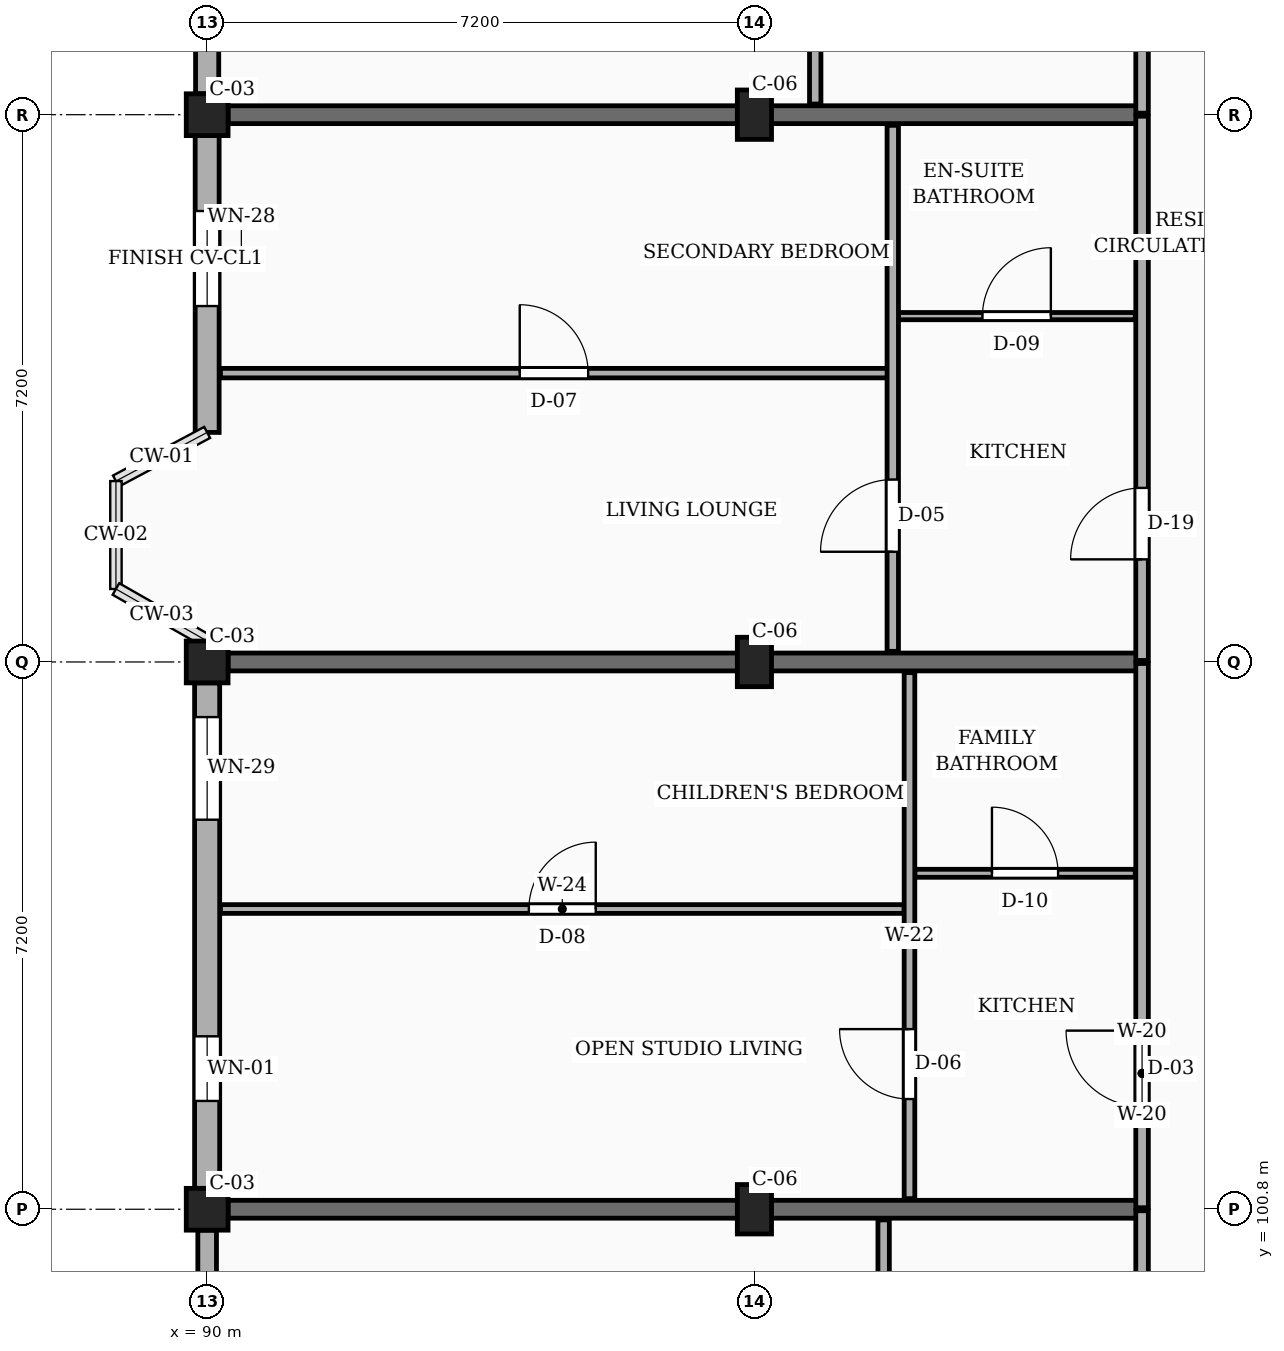
"""IFC4 building model, lengths in metres.
Left out: names, types, materials, properties, quantities, classifications, styles, units other than length and angle.
Written with IfcOpenShell. Run it as: python <this file> out.ifc"""

import sys

from ifc_helpers import new_model, si_unit, direction, frame, frame_2d, origin, origin_2d, place, context, subcontext, project, spatial, rectangle, extrude, element, fill, save


model = new_model("IFC4")
c1 = context("Model", 3, precision=1e-05, world=origin(), true_north=direction((0.0, 1.0)))
c2 = subcontext(c1, "Body", "Model", "MODEL_VIEW")
j1 = project(units=[si_unit("LENGTHUNIT", "METRE"), si_unit("PLANEANGLEUNIT", "RADIAN")], contexts=[c1])
p1 = place(None, origin())
s1 = spatial("IfcSite", under=j1, at=p1, CompositionType="ELEMENT")
p2 = place(p1, origin())
s2 = spatial("IfcBuilding", under=s1, at=p2, CompositionType="ELEMENT")
p3 = place(p2, frame((0.0, 0.0, 17.1)))
s3 = spatial("IfcBuildingStorey", under=s2, at=p3, CompositionType="ELEMENT", Elevation=17.1)
for number, where, z_axis, x_axis in (
    (1, (90.0, 100.8, 0.0), (0.0, 0.0, 1.0), (1.0, 0.0, 0.0)),
    (2, (90.0, 108.0, 0.0), (0.0, 0.0, 1.0), (1.0, 0.0, 0.0)),
    (3, (90.0, 115.2, 0.0), (0.0, 0.0, 1.0), (1.0, 0.0, 0.0)),
):
    element("IfcColumn", number, at=place(p3, frame(where, z_axis=z_axis, x_axis=x_axis)), inside=s3, PredefinedType="COLUMN", context=c2, shape_type="SweptSolid", body=[
        extrude(rectangle(XDim=0.55, YDim=0.55, at=origin_2d()), origin(), (0.0, 0.0, 1.0), 3.15),
    ])
for number, where, z_axis, x_axis in (
    (4, (97.2, 100.8, 0.0), (0.0, 0.0, 1.0), (1.0, 0.0, 0.0)),
    (5, (97.2, 108.0, 0.0), (0.0, 0.0, 1.0), (1.0, 0.0, 0.0)),
    (6, (97.2, 115.2, 0.0), (0.0, 0.0, 1.0), (1.0, 0.0, 0.0)),
):
    element("IfcColumn", number, at=place(p3, frame(where, z_axis=z_axis, x_axis=x_axis)), inside=s3, PredefinedType="COLUMN", context=c2, shape_type="SweptSolid", body=[
        extrude(rectangle(XDim=0.45, YDim=0.65, at=origin_2d()), origin(), (0.0, 0.0, 1.0), 3.15),
    ])
for number, where, z_axis, x_axis in (
    (7, (90.275, 100.8, 0.0), (0.0, 0.0, 1.0), (1.0, 0.0, 0.0)),
    (8, (90.275, 108.0, 0.0), (0.0, 0.0, 1.0), (1.0, 0.0, 0.0)),
    (9, (90.275, 115.2, 0.0), (0.0, 0.0, 1.0), (1.0, 0.0, 0.0)),
):
    element("IfcWall", number, at=place(p3, frame(where, z_axis=z_axis, x_axis=x_axis)), inside=s3, PredefinedType="SOLIDWALL", context=c2, shape_type="SweptSolid", body=[
        extrude(rectangle(XDim=12.025, YDim=0.235, at=frame_2d((6.013, 0.0))), origin(), (0.0, 0.0, 1.0), 2.19),
    ])
p4 = place(p3, frame((90.0, 122.125, 0.0), z_axis=(0.0, 0.0, 1.0), x_axis=(0.0, -1.0, 0.0)))
e10 = element("IfcWall", 10, at=p4, inside=s3, PredefinedType="SOLIDWALL", context=c2, shape_type="SweptSolid", body=[
    extrude(rectangle(XDim=6.65, YDim=0.305, at=frame_2d((3.325, 0.0))), origin(), (0.0, 0.0, 1.0), 2.46),
])
p5 = place(p4, frame((0.45, 0.0, 0.78)))
e11 = element("IfcOpeningElement", 11, at=p5, cuts=e10, PredefinedType="OPENING", context=c2, shape_type="SweptSolid", body=[
    extrude(rectangle(XDim=1.05, YDim=1.44, at=frame_2d((0.525, 0.72))), frame((0.0, 0.163, 0.0), z_axis=(0.0, -1.0, 0.0), x_axis=(1.0, 0.0, 0.0)), (0.0, 0.0, 1.0), 0.325),
])
p6 = place(p4, frame((4.65, 0.0, 0.78)))
e12 = element("IfcOpeningElement", 12, at=p6, cuts=e10, PredefinedType="OPENING", context=c2, shape_type="SweptSolid", body=[
    extrude(rectangle(XDim=1.25, YDim=1.44, at=frame_2d((0.625, 0.72))), frame((0.0, 0.163, 0.0), z_axis=(0.0, -1.0, 0.0), x_axis=(1.0, 0.0, 0.0)), (0.0, 0.0, 1.0), 0.325),
])
p7 = place(p3, frame((90.0, 114.925, 0.0), z_axis=(0.0, 0.0, 1.0), x_axis=(0.0, -1.0, 0.0)))
e13 = element("IfcWall", 13, at=p7, inside=s3, PredefinedType="SOLIDWALL", context=c2, shape_type="SweptSolid", body=[
    extrude(rectangle(XDim=3.905, YDim=0.315, at=frame_2d((1.953, 0.0))), origin(), (0.0, 0.0, 1.0), 2.46),
])
p8 = place(p7, frame((0.992, 0.0, 0.78)))
e14 = element("IfcOpeningElement", 14, at=p8, cuts=e13, PredefinedType="OPENING", context=c2, shape_type="SweptSolid", body=[
    extrude(rectangle(XDim=1.25, YDim=1.44, at=frame_2d((0.625, 0.72))), frame((0.0, 0.167, 0.0), z_axis=(0.0, -1.0, 0.0), x_axis=(1.0, 0.0, 0.0)), (0.0, 0.0, 1.0), 0.335),
])
p9 = place(p3, frame((90.0, 107.725, 0.0), z_axis=(0.0, 0.0, 1.0), x_axis=(0.0, -1.0, 0.0)))
e15 = element("IfcWall", 15, at=p9, inside=s3, PredefinedType="SOLIDWALL", context=c2, shape_type="SweptSolid", body=[
    extrude(rectangle(XDim=6.65, YDim=0.33, at=frame_2d((3.325, 0.0))), origin(), (0.0, 0.0, 1.0), 2.46),
])
p10 = place(p9, frame((0.45, 0.0, 0.78)))
e16 = element("IfcOpeningElement", 16, at=p10, cuts=e15, PredefinedType="OPENING", context=c2, shape_type="SweptSolid", body=[
    extrude(rectangle(XDim=1.35, YDim=1.44, at=frame_2d((0.675, 0.72))), frame((0.0, 0.175, 0.0), z_axis=(0.0, -1.0, 0.0), x_axis=(1.0, 0.0, 0.0)), (0.0, 0.0, 1.0), 0.35),
])
p11 = place(p9, frame((4.65, 0.0, 0.78)))
e17 = element("IfcOpeningElement", 17, at=p11, cuts=e15, PredefinedType="OPENING", context=c2, shape_type="SweptSolid", body=[
    extrude(rectangle(XDim=0.85, YDim=1.15, at=frame_2d((0.425, 0.575))), frame((0.0, 0.175, 0.0), z_axis=(0.0, -1.0, 0.0), x_axis=(1.0, 0.0, 0.0)), (0.0, 0.0, 1.0), 0.35),
])
p12 = place(p3, frame((90.0, 100.525, 0.0), z_axis=(0.0, 0.0, 1.0), x_axis=(0.0, -1.0, 0.0)))
e18 = element("IfcWall", 18, at=p12, inside=s3, PredefinedType="SOLIDWALL", context=c2, shape_type="SweptSolid", body=[
    extrude(rectangle(XDim=3.905, YDim=0.245, at=frame_2d((1.952, 0.0))), origin(), (0.0, 0.0, 1.0), 2.46),
])
p13 = place(p12, frame((1.218, 0.0, 0.78)))
e19 = element("IfcOpeningElement", 19, at=p13, cuts=e18, PredefinedType="OPENING", context=c2, shape_type="SweptSolid", body=[
    extrude(rectangle(XDim=0.85, YDim=1.15, at=frame_2d((0.425, 0.575))), frame((0.0, 0.133, 0.0), z_axis=(0.0, -1.0, 0.0), x_axis=(1.0, 0.0, 0.0)), (0.0, 0.0, 1.0), 0.265),
])
p14 = place(p3, frame((102.3, 93.62, 0.0), z_axis=(0.0, 0.0, 1.0), x_axis=(0.0, 1.0, 0.0)))
e20 = element("IfcWall", 20, at=p14, inside=s3, PredefinedType="PARTITIONING", context=c2, shape_type="SweptSolid", body=[
    extrude(rectangle(XDim=7.16, YDim=0.165, at=frame_2d((3.58, 0.0))), origin(), (0.0, 0.0, 1.0), 2.325),
])
p15 = place(p14, frame((1.33, 0.0, 0.0)))
e21 = element("IfcOpeningElement", 21, at=p15, cuts=e20, PredefinedType="OPENING", context=c2, shape_type="SweptSolid", body=[
    extrude(rectangle(XDim=1.14, YDim=2.18, at=frame_2d((0.57, 1.09))), frame((0.0, 0.093, 0.0), z_axis=(0.0, -1.0, 0.0), x_axis=(1.0, 0.0, 0.0)), (0.0, 0.0, 1.0), 0.185),
])
p16 = place(p3, frame((102.3, 100.82, 0.0), z_axis=(0.0, 0.0, 1.0), x_axis=(0.0, 1.0, 0.0)))
e22 = element("IfcWall", 22, at=p16, inside=s3, PredefinedType="PARTITIONING", context=c2, shape_type="SweptSolid", body=[
    extrude(rectangle(XDim=7.16, YDim=0.165, at=frame_2d((3.58, 0.0))), origin(), (0.0, 0.0, 1.0), 2.325),
])
p17 = place(p16, frame((1.33, 0.0, 0.0)))
e23 = element("IfcOpeningElement", 23, at=p17, cuts=e22, PredefinedType="OPENING", context=c2, shape_type="SweptSolid", body=[
    extrude(rectangle(XDim=1.0, YDim=2.15, at=frame_2d((0.5, 1.075))), frame((0.0, 0.093, 0.0), z_axis=(0.0, -1.0, 0.0), x_axis=(1.0, 0.0, 0.0)), (0.0, 0.0, 1.0), 0.185),
])
p18 = place(p3, frame((102.3, 108.02, 0.0), z_axis=(0.0, 0.0, 1.0), x_axis=(0.0, 1.0, 0.0)))
e24 = element("IfcWall", 24, at=p18, inside=s3, PredefinedType="PARTITIONING", context=c2, shape_type="SweptSolid", body=[
    extrude(rectangle(XDim=7.16, YDim=0.165, at=frame_2d((3.58, 0.0))), origin(), (0.0, 0.0, 1.0), 2.325),
])
p19 = place(p18, frame((1.33, 0.0, 0.0)))
e25 = element("IfcOpeningElement", 25, at=p19, cuts=e24, PredefinedType="OPENING", context=c2, shape_type="SweptSolid", body=[
    extrude(rectangle(XDim=0.94, YDim=2.12, at=frame_2d((0.47, 1.06))), frame((0.0, 0.093, 0.0), z_axis=(0.0, -1.0, 0.0), x_axis=(1.0, 0.0, 0.0)), (0.0, 0.0, 1.0), 0.185),
])
p20 = place(p3, frame((102.3, 115.22, 0.0), z_axis=(0.0, 0.0, 1.0), x_axis=(0.0, 1.0, 0.0)))
e26 = element("IfcWall", 26, at=p20, inside=s3, PredefinedType="PARTITIONING", context=c2, shape_type="SweptSolid", body=[
    extrude(rectangle(XDim=7.16, YDim=0.165, at=frame_2d((3.58, 0.0))), origin(), (0.0, 0.0, 1.0), 2.325),
])
p21 = place(p20, frame((4.78, 0.0, 0.0)))
e27 = element("IfcOpeningElement", 27, at=p21, cuts=e26, PredefinedType="OPENING", context=c2, shape_type="SweptSolid", body=[
    extrude(rectangle(XDim=1.14, YDim=2.18, at=frame_2d((0.57, 1.09))), frame((0.0, 0.093, 0.0), z_axis=(0.0, -1.0, 0.0), x_axis=(1.0, 0.0, 0.0)), (0.0, 0.0, 1.0), 0.185),
])
p22 = place(p3, frame((98.9, 93.74, 0.0), z_axis=(0.0, 0.0, 1.0), x_axis=(0.0, 1.0, 0.0)))
e28 = element("IfcWall", 28, at=p22, inside=s3, PredefinedType="PARTITIONING", context=c2, shape_type="SweptSolid", body=[
    extrude(rectangle(XDim=6.92, YDim=0.15, at=frame_2d((3.46, 0.0))), origin(), (0.0, 0.0, 1.0), 2.325),
])
p23 = place(p22, frame((1.31, 0.0, 0.0)))
e29 = element("IfcOpeningElement", 29, at=p23, cuts=e28, PredefinedType="OPENING", context=c2, shape_type="SweptSolid", body=[
    extrude(rectangle(XDim=0.95, YDim=2.1, at=frame_2d((0.475, 1.05))), frame((0.0, 0.085, 0.0), z_axis=(0.0, -1.0, 0.0), x_axis=(1.0, 0.0, 0.0)), (0.0, 0.0, 1.0), 0.17),
])
p24 = place(p3, frame((90.175, 104.75, 0.0), z_axis=(0.0, 0.0, 1.0), x_axis=(1.0, 0.0, 0.0)))
e30 = element("IfcWall", 30, at=p24, inside=s3, PredefinedType="PARTITIONING", context=c2, shape_type="SweptSolid", body=[
    extrude(rectangle(XDim=8.995, YDim=0.115, at=frame_2d((4.498, 0.0))), origin(), (0.0, 0.0, 1.0), 2.325),
])
p25 = place(p24, frame((4.058, 0.0, 0.0)))
e31 = element("IfcOpeningElement", 31, at=p25, cuts=e30, PredefinedType="OPENING", context=c2, shape_type="SweptSolid", body=[
    extrude(rectangle(XDim=0.88, YDim=2.08, at=frame_2d((0.44, 1.04))), frame((0.0, 0.067, 0.0), z_axis=(0.0, -1.0, 0.0), x_axis=(1.0, 0.0, 0.0)), (0.0, 0.0, 1.0), 0.135),
])
p26 = place(p3, frame((99.31, 105.22, 0.0), z_axis=(0.0, 0.0, 1.0), x_axis=(1.0, 0.0, 0.0)))
e32 = element("IfcWall", 32, at=p26, inside=s3, PredefinedType="PARTITIONING", context=c2, shape_type="SweptSolid", body=[
    extrude(rectangle(XDim=2.9, YDim=0.105, at=frame_2d((1.45, 0.0))), origin(), (0.0, 0.0, 1.0), 2.325),
])
p27 = place(p26, frame((1.015, 0.0, 0.0)))
e33 = element("IfcOpeningElement", 33, at=p27, cuts=e32, PredefinedType="OPENING", context=c2, shape_type="SweptSolid", body=[
    extrude(rectangle(XDim=0.87, YDim=2.05, at=frame_2d((0.435, 1.025))), frame((0.0, 0.062, 0.0), z_axis=(0.0, -1.0, 0.0), x_axis=(1.0, 0.0, 0.0)), (0.0, 0.0, 1.0), 0.125),
])
p28 = place(p3, frame((99.24, 100.94, 0.0), z_axis=(0.0, 0.0, 1.0), x_axis=(0.0, 1.0, 0.0)))
e34 = element("IfcWall", 34, at=p28, inside=s3, PredefinedType="PARTITIONING", context=c2, shape_type="SweptSolid", body=[
    extrude(rectangle(XDim=6.92, YDim=0.14, at=frame_2d((3.46, 0.0))), origin(), (0.0, 0.0, 1.0), 2.325),
])
p29 = place(p28, frame((1.31, 0.0, 0.0)))
e35 = element("IfcOpeningElement", 35, at=p29, cuts=e34, PredefinedType="OPENING", context=c2, shape_type="SweptSolid", body=[
    extrude(rectangle(XDim=0.92, YDim=2.1, at=frame_2d((0.46, 1.05))), frame((0.0, 0.08, 0.0), z_axis=(0.0, -1.0, 0.0), x_axis=(1.0, 0.0, 0.0)), (0.0, 0.0, 1.0), 0.16),
])
p30 = place(p3, frame((90.175, 111.8, 0.0), z_axis=(0.0, 0.0, 1.0), x_axis=(1.0, 0.0, 0.0)))
e36 = element("IfcWall", 36, at=p30, inside=s3, PredefinedType="PARTITIONING", context=c2, shape_type="SweptSolid", body=[
    extrude(rectangle(XDim=8.775, YDim=0.125, at=frame_2d((4.387, 0.0))), origin(), (0.0, 0.0, 1.0), 2.325),
])
p31 = place(p30, frame((3.938, 0.0, 0.0)))
e37 = element("IfcOpeningElement", 37, at=p31, cuts=e36, PredefinedType="OPENING", context=c2, shape_type="SweptSolid", body=[
    extrude(rectangle(XDim=0.9, YDim=2.1, at=frame_2d((0.45, 1.05))), frame((0.0, 0.073, 0.0), z_axis=(0.0, -1.0, 0.0), x_axis=(1.0, 0.0, 0.0)), (0.0, 0.0, 1.0), 0.145),
])
p32 = place(p3, frame((99.09, 112.55, 0.0), z_axis=(0.0, 0.0, 1.0), x_axis=(1.0, 0.0, 0.0)))
e38 = element("IfcWall", 38, at=p32, inside=s3, PredefinedType="PARTITIONING", context=c2, shape_type="SweptSolid", body=[
    extrude(rectangle(XDim=3.12, YDim=0.095, at=frame_2d((1.56, 0.0))), origin(), (0.0, 0.0, 1.0), 2.325),
])
p33 = place(p32, frame((1.11, 0.0, 0.0)))
e39 = element("IfcOpeningElement", 39, at=p33, cuts=e38, PredefinedType="OPENING", context=c2, shape_type="SweptSolid", body=[
    extrude(rectangle(XDim=0.9, YDim=2.05, at=frame_2d((0.45, 1.025))), frame((0.0, 0.058, 0.0), z_axis=(0.0, -1.0, 0.0), x_axis=(1.0, 0.0, 0.0)), (0.0, 0.0, 1.0), 0.115),
])
p34 = place(p3, frame((99.02, 108.14, 0.0), z_axis=(0.0, 0.0, 1.0), x_axis=(0.0, 1.0, 0.0)))
e40 = element("IfcWall", 40, at=p34, inside=s3, PredefinedType="PARTITIONING", context=c2, shape_type="SweptSolid", body=[
    extrude(rectangle(XDim=6.92, YDim=0.15, at=frame_2d((3.46, 0.0))), origin(), (0.0, 0.0, 1.0), 2.325),
])
p35 = place(p34, frame((1.31, 0.0, 0.0)))
e41 = element("IfcOpeningElement", 41, at=p35, cuts=e40, PredefinedType="OPENING", context=c2, shape_type="SweptSolid", body=[
    extrude(rectangle(XDim=0.95, YDim=2.1, at=frame_2d((0.475, 1.05))), frame((0.0, 0.085, 0.0), z_axis=(0.0, -1.0, 0.0), x_axis=(1.0, 0.0, 0.0)), (0.0, 0.0, 1.0), 0.17),
])
p36 = place(p3, frame((98.0, 115.34, 0.0), z_axis=(0.0, 0.0, 1.0), x_axis=(0.0, 1.0, 0.0)))
e42 = element("IfcWall", 42, at=p36, inside=s3, PredefinedType="PARTITIONING", context=c2, shape_type="SweptSolid", body=[
    extrude(rectangle(XDim=6.92, YDim=0.15, at=frame_2d((3.46, 0.0))), origin(), (0.0, 0.0, 1.0), 2.325),
])
p37 = place(p36, frame((4.66, 0.0, 0.0)))
e43 = element("IfcOpeningElement", 43, at=p37, cuts=e42, PredefinedType="OPENING", context=c2, shape_type="SweptSolid", body=[
    extrude(rectangle(XDim=0.95, YDim=2.1, at=frame_2d((0.475, 1.05))), frame((0.0, 0.085, 0.0), z_axis=(0.0, -1.0, 0.0), x_axis=(1.0, 0.0, 0.0)), (0.0, 0.0, 1.0), 0.17),
])
p38 = place(p8, origin())
e44 = element("IfcWindow", 44, at=p38, inside=s3, PartitioningType="SINGLE_PANEL", PredefinedType="WINDOW", context=c2, shape_type="SweptSolid", body=[
    extrude(rectangle(XDim=1.25, YDim=1.44, at=frame_2d((0.625, 0.72))), frame((0.0, 0.03, 0.0), z_axis=(0.0, -1.0, 0.0), x_axis=(1.0, 0.0, 0.0)), (0.0, 0.0, 1.0), 0.06),
])
fill(e14, e44)
p39 = place(p10, origin())
e45 = element("IfcWindow", 45, at=p39, inside=s3, PartitioningType="SINGLE_PANEL", PredefinedType="WINDOW", context=c2, shape_type="SweptSolid", body=[
    extrude(rectangle(XDim=1.35, YDim=1.44, at=frame_2d((0.675, 0.72))), frame((0.0, 0.03, 0.0), z_axis=(0.0, -1.0, 0.0), x_axis=(1.0, 0.0, 0.0)), (0.0, 0.0, 1.0), 0.06),
])
fill(e16, e45)
p40 = place(p11, origin())
e46 = element("IfcWindow", 46, at=p40, inside=s3, PartitioningType="SINGLE_PANEL", PredefinedType="WINDOW", context=c2, shape_type="SweptSolid", body=[
    extrude(rectangle(XDim=0.85, YDim=1.15, at=frame_2d((0.425, 0.575))), frame((0.0, 0.03, 0.0), z_axis=(0.0, -1.0, 0.0), x_axis=(1.0, 0.0, 0.0)), (0.0, 0.0, 1.0), 0.06),
])
fill(e17, e46)
p41 = place(p17, origin())
e47 = element("IfcDoor", 47, at=p41, inside=s3, OperationType="SINGLE_SWING_RIGHT", PredefinedType="DOOR", context=c2, shape_type="SweptSolid", body=[
    extrude(rectangle(XDim=1.0, YDim=2.15, at=frame_2d((0.5, 1.075))), frame((0.0, 0.025, 0.0), z_axis=(0.0, -1.0, 0.0), x_axis=(1.0, 0.0, 0.0)), (0.0, 0.0, 1.0), 0.05),
])
fill(e23, e47)
p42 = place(p19, origin())
e48 = element("IfcDoor", 48, at=p42, inside=s3, OperationType="SINGLE_SWING_LEFT", PredefinedType="DOOR", context=c2, shape_type="SweptSolid", body=[
    extrude(rectangle(XDim=0.94, YDim=2.12, at=frame_2d((0.47, 1.06))), frame((0.0, 0.025, 0.0), z_axis=(0.0, -1.0, 0.0), x_axis=(1.0, 0.0, 0.0)), (0.0, 0.0, 1.0), 0.05),
])
fill(e25, e48)
p43 = place(p25, origin())
e49 = element("IfcDoor", 49, at=p43, inside=s3, OperationType="SINGLE_SWING_RIGHT", PredefinedType="DOOR", context=c2, shape_type="SweptSolid", body=[
    extrude(rectangle(XDim=0.88, YDim=2.08, at=frame_2d((0.44, 1.04))), frame((0.0, 0.025, 0.0), z_axis=(0.0, -1.0, 0.0), x_axis=(1.0, 0.0, 0.0)), (0.0, 0.0, 1.0), 0.05),
])
fill(e31, e49)
p44 = place(p27, origin())
e50 = element("IfcDoor", 50, at=p44, inside=s3, OperationType="SINGLE_SWING_LEFT", PredefinedType="DOOR", context=c2, shape_type="SweptSolid", body=[
    extrude(rectangle(XDim=0.87, YDim=2.05, at=frame_2d((0.435, 1.025))), frame((0.0, 0.025, 0.0), z_axis=(0.0, -1.0, 0.0), x_axis=(1.0, 0.0, 0.0)), (0.0, 0.0, 1.0), 0.05),
])
fill(e33, e50)
p45 = place(p29, origin())
e51 = element("IfcDoor", 51, at=p45, inside=s3, OperationType="SINGLE_SWING_RIGHT", PredefinedType="DOOR", context=c2, shape_type="SweptSolid", body=[
    extrude(rectangle(XDim=0.92, YDim=2.1, at=frame_2d((0.46, 1.05))), frame((0.0, 0.025, 0.0), z_axis=(0.0, -1.0, 0.0), x_axis=(1.0, 0.0, 0.0)), (0.0, 0.0, 1.0), 0.05),
])
fill(e35, e51)
p46 = place(p31, origin())
e52 = element("IfcDoor", 52, at=p46, inside=s3, OperationType="SINGLE_SWING_LEFT", PredefinedType="DOOR", context=c2, shape_type="SweptSolid", body=[
    extrude(rectangle(XDim=0.9, YDim=2.1, at=frame_2d((0.45, 1.05))), frame((0.0, 0.025, 0.0), z_axis=(0.0, -1.0, 0.0), x_axis=(1.0, 0.0, 0.0)), (0.0, 0.0, 1.0), 0.05),
])
fill(e37, e52)
p47 = place(p33, origin())
e53 = element("IfcDoor", 53, at=p47, inside=s3, OperationType="SINGLE_SWING_RIGHT", PredefinedType="DOOR", context=c2, shape_type="SweptSolid", body=[
    extrude(rectangle(XDim=0.9, YDim=2.05, at=frame_2d((0.45, 1.025))), frame((0.0, 0.025, 0.0), z_axis=(0.0, -1.0, 0.0), x_axis=(1.0, 0.0, 0.0)), (0.0, 0.0, 1.0), 0.05),
])
fill(e39, e53)
p48 = place(p35, origin())
e54 = element("IfcDoor", 54, at=p48, inside=s3, OperationType="SINGLE_SWING_LEFT", PredefinedType="DOOR", context=c2, shape_type="SweptSolid", body=[
    extrude(rectangle(XDim=0.95, YDim=2.1, at=frame_2d((0.475, 1.05))), frame((0.0, 0.025, 0.0), z_axis=(0.0, -1.0, 0.0), x_axis=(1.0, 0.0, 0.0)), (0.0, 0.0, 1.0), 0.05),
])
fill(e41, e54)
save(model, sys.argv[1])
